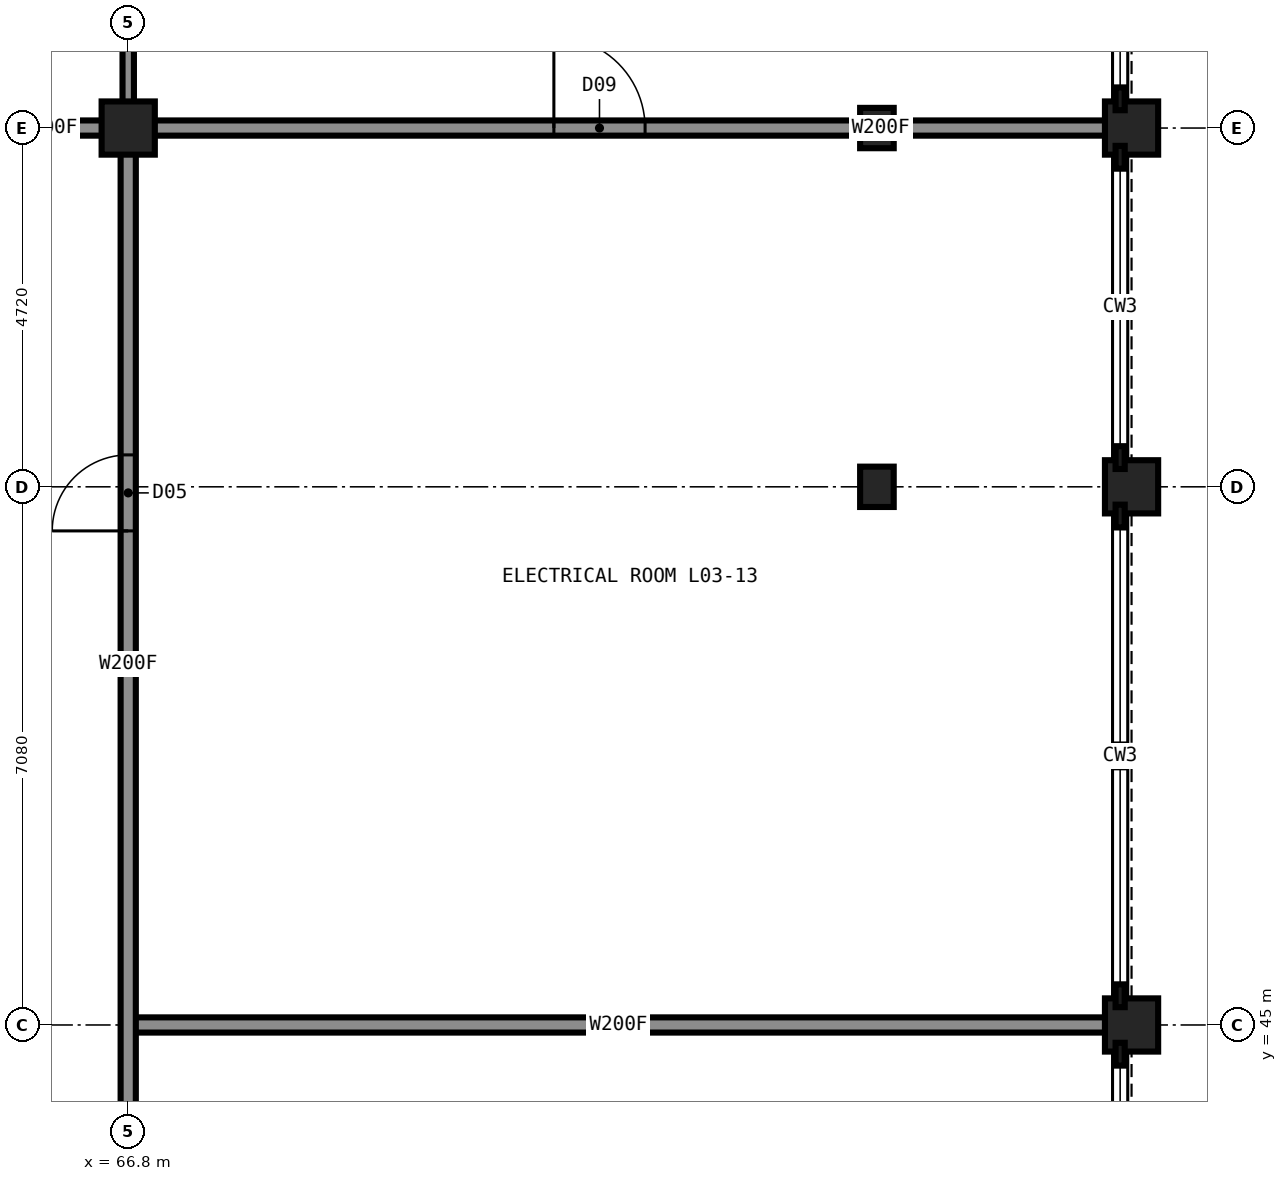
"""IFC4 building model, lengths in metres.
Left out: names, types, materials, properties, quantities, classifications, styles, units other than length and angle.
Written with IfcOpenShell. Run it as: python <this file> out.ifc"""

import sys

from ifc_helpers import new_model, si_unit, direction, frame, frame_2d, origin, origin_2d, place, context, subcontext, project, spatial, rectangle, hollow_rectangle, i_section, extrude, element, fill, save


model = new_model("IFC4")
c1 = context("Model", 3, precision=1e-05, world=origin(), true_north=direction((0.0, 1.0)))
c2 = subcontext(c1, "Body", "Model", "MODEL_VIEW")
j1 = project(units=[si_unit("LENGTHUNIT", "METRE"), si_unit("PLANEANGLEUNIT", "RADIAN")], contexts=[c1])
p1 = place(None, origin())
s1 = spatial("IfcSite", under=j1, at=p1, CompositionType="ELEMENT")
p2 = place(p1, origin())
s2 = spatial("IfcBuilding", under=s1, at=p2, CompositionType="ELEMENT")
p3 = place(p2, frame((0.0, 0.0, 16.0)))
s3 = spatial("IfcBuildingStorey", under=s2, at=p3, CompositionType="ELEMENT", Elevation=16.0)
for number, where, z_axis, x_axis in (
    (1, (76.65, 52.08, 0.0), (0.0, 0.0, 1.0), (1.0, 0.0, 0.0)),
    (2, (76.65, 56.8, 0.0), (0.0, 0.0, 1.0), (1.0, 0.0, 0.0)),
):
    element("IfcColumn", number, at=place(p3, frame(where, z_axis=z_axis, x_axis=x_axis)), inside=s3, PredefinedType="COLUMN", context=c2, shape_type="SweptSolid", body=[
        extrude(i_section(OverallWidth=0.442, OverallDepth=0.531, WebThickness=0.066, FlangeThickness=0.106, at=origin_2d()), origin(), (0.0, 0.0, 1.0), 4.5),
    ])
p4 = place(p3, frame((66.8, 56.8, 0.0), z_axis=(0.0, 0.0, 1.0), x_axis=(1.0, 0.0, 0.0)))
e3 = element("IfcColumn", 3, at=p4, inside=s3, PredefinedType="COLUMN", context=c2, shape_type="SweptSolid", body=[
    extrude(hollow_rectangle(XDim=0.7, YDim=0.7, WallThickness=0.06, at=origin_2d()), origin(), (0.0, 0.0, 1.0), 4.5),
])
for number, where, z_axis, x_axis in (
    (4, (80.0, 45.0, 0.0), (0.0, 0.0, 1.0), (1.0, 0.0, 0.0)),
    (5, (80.0, 52.08, 0.0), (0.0, 0.0, 1.0), (1.0, 0.0, 0.0)),
    (6, (80.0, 56.8, 0.0), (0.0, 0.0, 1.0), (1.0, 0.0, 0.0)),
):
    element("IfcColumn", number, at=place(p3, frame(where, z_axis=z_axis, x_axis=x_axis)), inside=s3, PredefinedType="COLUMN", context=c2, shape_type="SweptSolid", body=[
        extrude(rectangle(XDim=0.7, YDim=0.7, at=origin_2d()), origin(), (0.0, 0.0, 1.0), 4.5),
    ])
p5 = place(p3, frame((66.8, 45.0, 0.0), z_axis=(0.0, 0.0, 1.0), x_axis=(1.0, 0.0, 0.0)))
e7 = element("IfcWall", 7, at=p5, inside=s3, PredefinedType="PARTITIONING", context=c2, shape_type="SweptSolid", body=[
    extrude(rectangle(XDim=12.9, YDim=0.2, at=frame_2d((6.45, 0.0))), origin(), (0.0, 0.0, 1.0), 4.15),
])
p6 = place(p3, frame((64.7, 56.8, 0.0), z_axis=(0.0, 0.0, 1.0), x_axis=(1.0, 0.0, 0.0)))
e8 = element("IfcWall", 8, at=p6, inside=s3, PredefinedType="PARTITIONING", context=c2, shape_type="SweptSolid", body=[
    extrude(rectangle(XDim=2.1, YDim=0.2, at=frame_2d((1.05, 0.0))), origin(), (0.0, 0.0, 1.0), 4.15),
])
p7 = place(p3, frame((66.8, 56.8, 0.0), z_axis=(0.0, 0.0, 1.0), x_axis=(1.0, 0.0, 0.0)))
e9 = element("IfcWall", 9, at=p7, inside=s3, PredefinedType="PARTITIONING", context=c2, shape_type="SweptSolid", body=[
    extrude(rectangle(XDim=12.9, YDim=0.2, at=frame_2d((6.45, 0.0))), origin(), (0.0, 0.0, 1.0), 4.15),
])
p8 = place(p7, frame((5.6, 0.0, 0.0)))
e10 = element("IfcOpeningElement", 10, at=p8, cuts=e9, PredefinedType="OPENING", context=c2, shape_type="SweptSolid", body=[
    extrude(rectangle(XDim=1.2, YDim=2.2, at=frame_2d((0.6, 1.1))), frame((0.0, 0.11, 0.0), z_axis=(0.0, -1.0, 0.0), x_axis=(1.0, 0.0, 0.0)), (0.0, 0.0, 1.0), 0.22),
])
p9 = place(p3, frame((66.8, 42.7, 0.0), z_axis=(0.0, 0.0, 1.0), x_axis=(0.0, 1.0, 0.0)))
e11 = element("IfcWall", 11, at=p9, inside=s3, PredefinedType="PARTITIONING", context=c2, shape_type="SweptSolid", body=[
    extrude(rectangle(XDim=14.1, YDim=0.2, at=frame_2d((7.05, 0.0))), origin(), (0.0, 0.0, 1.0), 4.15),
])
p10 = place(p9, frame((8.8, 0.0, 0.0)))
e12 = element("IfcOpeningElement", 12, at=p10, cuts=e11, PredefinedType="OPENING", context=c2, shape_type="SweptSolid", body=[
    extrude(rectangle(XDim=1.0, YDim=2.1, at=frame_2d((0.5, 1.05))), frame((0.0, 0.11, 0.0), z_axis=(0.0, -1.0, 0.0), x_axis=(1.0, 0.0, 0.0)), (0.0, 0.0, 1.0), 0.22),
])
p11 = place(p3, frame((66.8, 56.8, 0.0), z_axis=(0.0, 0.0, 1.0), x_axis=(0.0, 1.0, 0.0)))
e13 = element("IfcWall", 13, at=p11, inside=s3, PredefinedType="PARTITIONING", context=c2, shape_type="SweptSolid", body=[
    extrude(rectangle(XDim=13.9, YDim=0.15, at=frame_2d((6.95, 0.0))), origin(), (0.0, 0.0, 1.0), 4.15),
])
p12 = place(p11, frame((6.6, 0.0, 0.0)))
e14 = element("IfcOpeningElement", 14, at=p12, cuts=e13, PredefinedType="OPENING", context=c2, shape_type="SweptSolid", body=[
    extrude(rectangle(XDim=1.2, YDim=2.2, at=frame_2d((0.6, 1.1))), frame((0.0, 0.085, 0.0), z_axis=(0.0, -1.0, 0.0), x_axis=(1.0, 0.0, 0.0)), (0.0, 0.0, 1.0), 0.17),
])
p13 = place(p8, origin())
e15 = element("IfcDoor", 15, at=p13, inside=s3, OperationType="SINGLE_SWING_LEFT", PredefinedType="DOOR", context=c2, shape_type="SweptSolid", body=[
    extrude(rectangle(XDim=1.2, YDim=2.2, at=frame_2d((0.6, 1.1))), frame((0.0, 0.025, 0.0), z_axis=(0.0, -1.0, 0.0), x_axis=(1.0, 0.0, 0.0)), (0.0, 0.0, 1.0), 0.05),
])
fill(e10, e15)
p14 = place(p10, origin())
e16 = element("IfcDoor", 16, at=p14, inside=s3, OperationType="SINGLE_SWING_LEFT", PredefinedType="DOOR", context=c2, shape_type="SweptSolid", body=[
    extrude(rectangle(XDim=1.0, YDim=2.1, at=frame_2d((0.5, 1.05))), frame((0.0, 0.025, 0.0), z_axis=(0.0, -1.0, 0.0), x_axis=(1.0, 0.0, 0.0)), (0.0, 0.0, 1.0), 0.05),
])
fill(e12, e16)
save(model, sys.argv[1])
